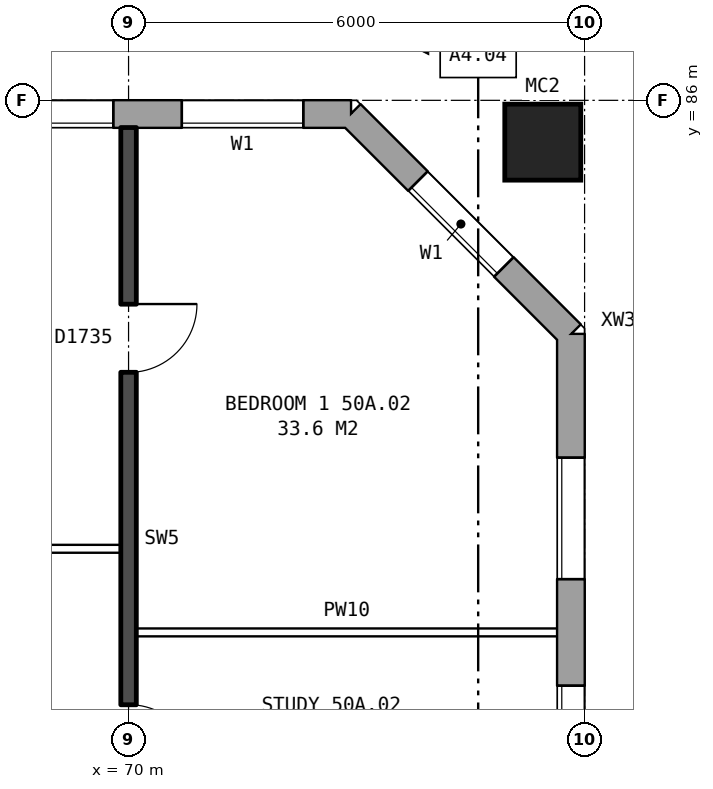
"""IFC4 building model, lengths in metres.
Left out: names, types, materials, properties, quantities, classifications, styles, units other than length and angle.
Written with IfcOpenShell. Run it as: python <this file> out.ifc"""

import sys

from ifc_helpers import new_model, si_unit, direction, frame, frame_2d, origin, origin_2d, place, context, subcontext, project, spatial, rectangle, hollow_rectangle, extrude, element, fill, save


model = new_model("IFC4")
c1 = context("Model", 3, precision=1e-05, world=origin(), true_north=direction((0.0, 1.0)))
c2 = subcontext(c1, "Body", "Model", "MODEL_VIEW")
j1 = project(units=[si_unit("LENGTHUNIT", "METRE"), si_unit("PLANEANGLEUNIT", "RADIAN")], contexts=[c1])
p1 = place(None, origin())
s1 = spatial("IfcSite", under=j1, at=p1, CompositionType="ELEMENT")
p2 = place(p1, origin())
s2 = spatial("IfcBuilding", under=s1, at=p2, CompositionType="ELEMENT")
p3 = place(p2, frame((0.0, 0.0, 178.9)))
s3 = spatial("IfcBuildingStorey", under=s2, at=p3, CompositionType="ELEMENT", Elevation=178.9)
p4 = place(p3, frame((75.45, 85.45, 0.0), z_axis=(0.0, 0.0, 1.0), x_axis=(1.0, 0.0, 0.0)))
e1 = element("IfcColumn", 1, at=p4, inside=s3, PredefinedType="COLUMN", context=c2, shape_type="SweptSolid", body=[
    extrude(hollow_rectangle(XDim=1.0, YDim=1.0, WallThickness=0.055, at=origin_2d()), origin(), (0.0, 0.0, 1.0), 3.1),
])
p5 = place(p3, frame((75.82, 57.075, 0.0), z_axis=(0.0, 0.0, 1.0), x_axis=(0.0, 1.0, 0.0)))
e2 = element("IfcWall", 2, at=p5, inside=s3, PredefinedType="STANDARD", context=c2, shape_type="SweptSolid", body=[
    extrude(rectangle(XDim=25.851, YDim=0.36, at=frame_2d((12.925, 0.0))), origin(), (0.0, 0.0, 1.0), 2.85),
])
p6 = place(p5, frame((1.625, 0.0, 0.8)))
e3 = element("IfcOpeningElement", 3, at=p6, cuts=e2, PredefinedType="OPENING", context=c2, shape_type="SweptSolid", body=[
    extrude(rectangle(XDim=1.6, YDim=1.8, at=frame_2d((0.8, 0.9))), frame((0.0, 0.19, 0.0), z_axis=(0.0, -1.0, 0.0), x_axis=(1.0, 0.0, 0.0)), (0.0, 0.0, 1.0), 0.38),
])
p7 = place(p5, frame((4.625, 0.0, 0.8)))
e4 = element("IfcOpeningElement", 4, at=p7, cuts=e2, PredefinedType="OPENING", context=c2, shape_type="SweptSolid", body=[
    extrude(rectangle(XDim=1.6, YDim=1.8, at=frame_2d((0.8, 0.9))), frame((0.0, 0.19, 0.0), z_axis=(0.0, -1.0, 0.0), x_axis=(1.0, 0.0, 0.0)), (0.0, 0.0, 1.0), 0.38),
])
p8 = place(p5, frame((19.625, 0.0, 0.8)))
e5 = element("IfcOpeningElement", 5, at=p8, cuts=e2, PredefinedType="OPENING", context=c2, shape_type="SweptSolid", body=[
    extrude(rectangle(XDim=1.6, YDim=1.8, at=frame_2d((0.8, 0.9))), frame((0.0, 0.19, 0.0), z_axis=(0.0, -1.0, 0.0), x_axis=(1.0, 0.0, 0.0)), (0.0, 0.0, 1.0), 0.38),
])
p9 = place(p5, frame((22.625, 0.0, 0.8)))
e6 = element("IfcOpeningElement", 6, at=p9, cuts=e2, PredefinedType="OPENING", context=c2, shape_type="SweptSolid", body=[
    extrude(rectangle(XDim=1.6, YDim=1.8, at=frame_2d((0.8, 0.9))), frame((0.0, 0.19, 0.0), z_axis=(0.0, -1.0, 0.0), x_axis=(1.0, 0.0, 0.0)), (0.0, 0.0, 1.0), 0.38),
])
p10 = place(p3, frame((75.82, 82.925, 0.0), z_axis=(0.0, 0.0, 1.0), x_axis=(-0.707106781187, 0.707106781187, 0.0)))
e7 = element("IfcWall", 7, at=p10, inside=s3, PredefinedType="STANDARD", context=c2, shape_type="SweptSolid", body=[
    extrude(rectangle(XDim=4.094, YDim=0.36, at=frame_2d((2.047, 0.0))), origin(), (0.0, 0.0, 1.0), 2.85),
])
p11 = place(p10, frame((1.247, 0.0, 0.8)))
e8 = element("IfcOpeningElement", 8, at=p11, cuts=e7, PredefinedType="OPENING", context=c2, shape_type="SweptSolid", body=[
    extrude(rectangle(XDim=1.6, YDim=1.8, at=frame_2d((0.8, 0.9))), frame((0.0, 0.19, 0.0), z_axis=(0.0, -1.0, 0.0), x_axis=(1.0, 0.0, 0.0)), (0.0, 0.0, 1.0), 0.38),
])
p12 = place(p3, frame((72.925, 85.82, 0.0), z_axis=(0.0, 0.0, 1.0), x_axis=(-1.0, 0.0, 0.0)))
e9 = element("IfcWall", 9, at=p12, inside=s3, PredefinedType="STANDARD", context=c2, shape_type="SweptSolid", body=[
    extrude(rectangle(XDim=39.601, YDim=0.36, at=frame_2d((19.8, 0.0))), origin(), (0.0, 0.0, 1.0), 2.85),
])
p13 = place(p12, frame((0.625, 0.0, 0.8)))
e10 = element("IfcOpeningElement", 10, at=p13, cuts=e9, PredefinedType="OPENING", context=c2, shape_type="SweptSolid", body=[
    extrude(rectangle(XDim=1.6, YDim=1.8, at=frame_2d((0.8, 0.9))), frame((0.0, 0.19, 0.0), z_axis=(0.0, -1.0, 0.0), x_axis=(1.0, 0.0, 0.0)), (0.0, 0.0, 1.0), 0.38),
])
p14 = place(p12, frame((3.125, 0.0, 0.8)))
e11 = element("IfcOpeningElement", 11, at=p14, cuts=e9, PredefinedType="OPENING", context=c2, shape_type="SweptSolid", body=[
    extrude(rectangle(XDim=1.6, YDim=1.8, at=frame_2d((0.8, 0.9))), frame((0.0, 0.19, 0.0), z_axis=(0.0, -1.0, 0.0), x_axis=(1.0, 0.0, 0.0)), (0.0, 0.0, 1.0), 0.38),
])
p15 = place(p12, frame((5.025, 0.0, 1.7)))
e12 = element("IfcOpeningElement", 12, at=p15, cuts=e9, PredefinedType="OPENING", context=c2, shape_type="SweptSolid", body=[
    extrude(rectangle(XDim=0.6, YDim=0.9, at=frame_2d((0.3, 0.45))), frame((0.0, 0.19, 0.0), z_axis=(0.0, -1.0, 0.0), x_axis=(1.0, 0.0, 0.0)), (0.0, 0.0, 1.0), 0.38),
])
p16 = place(p12, frame((9.625, 0.0, 0.8)))
e13 = element("IfcOpeningElement", 13, at=p16, cuts=e9, PredefinedType="OPENING", context=c2, shape_type="SweptSolid", body=[
    extrude(rectangle(XDim=1.6, YDim=1.8, at=frame_2d((0.8, 0.9))), frame((0.0, 0.19, 0.0), z_axis=(0.0, -1.0, 0.0), x_axis=(1.0, 0.0, 0.0)), (0.0, 0.0, 1.0), 0.38),
])
p17 = place(p12, frame((12.625, 0.0, 0.8)))
e14 = element("IfcOpeningElement", 14, at=p17, cuts=e9, PredefinedType="OPENING", context=c2, shape_type="SweptSolid", body=[
    extrude(rectangle(XDim=1.6, YDim=1.8, at=frame_2d((0.8, 0.9))), frame((0.0, 0.19, 0.0), z_axis=(0.0, -1.0, 0.0), x_axis=(1.0, 0.0, 0.0)), (0.0, 0.0, 1.0), 0.38),
])
p18 = place(p12, frame((15.625, 0.0, 0.8)))
e15 = element("IfcOpeningElement", 15, at=p18, cuts=e9, PredefinedType="OPENING", context=c2, shape_type="SweptSolid", body=[
    extrude(rectangle(XDim=1.6, YDim=1.8, at=frame_2d((0.8, 0.9))), frame((0.0, 0.19, 0.0), z_axis=(0.0, -1.0, 0.0), x_axis=(1.0, 0.0, 0.0)), (0.0, 0.0, 1.0), 0.38),
])
p19 = place(p12, frame((18.625, 0.0, 0.8)))
e16 = element("IfcOpeningElement", 16, at=p19, cuts=e9, PredefinedType="OPENING", context=c2, shape_type="SweptSolid", body=[
    extrude(rectangle(XDim=1.6, YDim=1.8, at=frame_2d((0.8, 0.9))), frame((0.0, 0.19, 0.0), z_axis=(0.0, -1.0, 0.0), x_axis=(1.0, 0.0, 0.0)), (0.0, 0.0, 1.0), 0.38),
])
p20 = place(p12, frame((21.625, 0.0, 0.8)))
e17 = element("IfcOpeningElement", 17, at=p20, cuts=e9, PredefinedType="OPENING", context=c2, shape_type="SweptSolid", body=[
    extrude(rectangle(XDim=1.6, YDim=1.8, at=frame_2d((0.8, 0.9))), frame((0.0, 0.19, 0.0), z_axis=(0.0, -1.0, 0.0), x_axis=(1.0, 0.0, 0.0)), (0.0, 0.0, 1.0), 0.38),
])
p21 = place(p12, frame((24.625, 0.0, 0.8)))
e18 = element("IfcOpeningElement", 18, at=p21, cuts=e9, PredefinedType="OPENING", context=c2, shape_type="SweptSolid", body=[
    extrude(rectangle(XDim=1.6, YDim=1.8, at=frame_2d((0.8, 0.9))), frame((0.0, 0.19, 0.0), z_axis=(0.0, -1.0, 0.0), x_axis=(1.0, 0.0, 0.0)), (0.0, 0.0, 1.0), 0.38),
])
p22 = place(p12, frame((27.625, 0.0, 0.8)))
e19 = element("IfcOpeningElement", 19, at=p22, cuts=e9, PredefinedType="OPENING", context=c2, shape_type="SweptSolid", body=[
    extrude(rectangle(XDim=1.6, YDim=1.8, at=frame_2d((0.8, 0.9))), frame((0.0, 0.19, 0.0), z_axis=(0.0, -1.0, 0.0), x_axis=(1.0, 0.0, 0.0)), (0.0, 0.0, 1.0), 0.38),
])
p23 = place(p12, frame((30.625, 0.0, 0.8)))
e20 = element("IfcOpeningElement", 20, at=p23, cuts=e9, PredefinedType="OPENING", context=c2, shape_type="SweptSolid", body=[
    extrude(rectangle(XDim=1.6, YDim=1.8, at=frame_2d((0.8, 0.9))), frame((0.0, 0.19, 0.0), z_axis=(0.0, -1.0, 0.0), x_axis=(1.0, 0.0, 0.0)), (0.0, 0.0, 1.0), 0.38),
])
p24 = place(p12, frame((33.925, 0.0, 1.7)))
e21 = element("IfcOpeningElement", 21, at=p24, cuts=e9, PredefinedType="OPENING", context=c2, shape_type="SweptSolid", body=[
    extrude(rectangle(XDim=0.6, YDim=0.9, at=frame_2d((0.3, 0.45))), frame((0.0, 0.19, 0.0), z_axis=(0.0, -1.0, 0.0), x_axis=(1.0, 0.0, 0.0)), (0.0, 0.0, 1.0), 0.38),
])
p25 = place(p12, frame((36.625, 0.0, 0.8)))
e22 = element("IfcOpeningElement", 22, at=p25, cuts=e9, PredefinedType="OPENING", context=c2, shape_type="SweptSolid", body=[
    extrude(rectangle(XDim=1.6, YDim=1.8, at=frame_2d((0.8, 0.9))), frame((0.0, 0.19, 0.0), z_axis=(0.0, -1.0, 0.0), x_axis=(1.0, 0.0, 0.0)), (0.0, 0.0, 1.0), 0.38),
])
p26 = place(p12, frame((6.825, 0.0, 0.8)))
e23 = element("IfcOpeningElement", 23, at=p26, cuts=e9, PredefinedType="OPENING", context=c2, shape_type="SweptSolid", body=[
    extrude(rectangle(XDim=0.6, YDim=0.9, at=frame_2d((0.3, 0.45))), frame((0.0, 0.19, 0.0), z_axis=(0.0, -1.0, 0.0), x_axis=(1.0, 0.0, 0.0)), (0.0, 0.0, 1.0), 0.38),
])
p27 = place(p12, frame((7.725, 0.0, 0.8)))
e24 = element("IfcOpeningElement", 24, at=p27, cuts=e9, PredefinedType="OPENING", context=c2, shape_type="SweptSolid", body=[
    extrude(rectangle(XDim=1.0, YDim=1.8, at=frame_2d((0.5, 0.9))), frame((0.0, 0.19, 0.0), z_axis=(0.0, -1.0, 0.0), x_axis=(1.0, 0.0, 0.0)), (0.0, 0.0, 1.0), 0.38),
])
p28 = place(p12, frame((34.825, 0.0, 0.8)))
e25 = element("IfcOpeningElement", 25, at=p28, cuts=e9, PredefinedType="OPENING", context=c2, shape_type="SweptSolid", body=[
    extrude(rectangle(XDim=1.4, YDim=1.8, at=frame_2d((0.7, 0.9))), frame((0.0, 0.19, 0.0), z_axis=(0.0, -1.0, 0.0), x_axis=(1.0, 0.0, 0.0)), (0.0, 0.0, 1.0), 0.38),
])
p29 = place(p3, frame((70.1, 79.0, 0.0), z_axis=(0.0, 0.0, 1.0), x_axis=(1.0, 0.0, 0.0)))
e26 = element("IfcWall", 26, at=p29, inside=s3, PredefinedType="PARTITIONING", context=c2, shape_type="SweptSolid", body=[
    extrude(rectangle(XDim=5.54, YDim=0.1, at=frame_2d((2.77, 0.0))), origin(), (0.0, 0.0, 1.0), 2.85),
])
p30 = place(p3, frame((64.1, 80.1, 0.0), z_axis=(0.0, 0.0, 1.0), x_axis=(1.0, 0.0, 0.0)))
e27 = element("IfcWall", 27, at=p30, inside=s3, PredefinedType="PARTITIONING", context=c2, shape_type="SweptSolid", body=[
    extrude(rectangle(XDim=5.8, YDim=0.1, at=frame_2d((2.9, 0.0))), origin(), (0.0, 0.0, 1.0), 2.85),
])
p31 = place(p30, frame((3.6, 0.0, 0.0)))
e28 = element("IfcOpeningElement", 28, at=p31, cuts=e27, PredefinedType="OPENING", context=c2, shape_type="SweptSolid", body=[
    extrude(rectangle(XDim=0.9, YDim=2.1, at=frame_2d((0.45, 1.05))), frame((0.0, 0.06, 0.0), z_axis=(0.0, -1.0, 0.0), x_axis=(1.0, 0.0, 0.0)), (0.0, 0.0, 1.0), 0.12),
])
p32 = place(p30, frame((0.7, 0.0, 0.0)))
e29 = element("IfcOpeningElement", 29, at=p32, cuts=e27, PredefinedType="OPENING", context=c2, shape_type="SweptSolid", body=[
    extrude(rectangle(XDim=0.9, YDim=2.1, at=frame_2d((0.45, 1.05))), frame((0.0, 0.06, 0.0), z_axis=(0.0, -1.0, 0.0), x_axis=(1.0, 0.0, 0.0)), (0.0, 0.0, 1.0), 0.12),
])
p33 = place(p3, frame((70.0, 76.2, 0.0), z_axis=(0.0, 0.0, 1.0), x_axis=(0.0, 1.0, 0.0)))
e30 = element("IfcWall", 30, at=p33, inside=s3, PredefinedType="SOLIDWALL", context=c2, shape_type="SweptSolid", body=[
    extrude(rectangle(XDim=9.44, YDim=0.2, at=frame_2d((4.72, 0.0))), origin(), (0.0, 0.0, 1.0), 2.85),
])
p34 = place(p33, frame((6.22, 0.0, 0.0)))
e31 = element("IfcOpeningElement", 31, at=p34, cuts=e30, PredefinedType="OPENING", context=c2, shape_type="SweptSolid", body=[
    extrude(rectangle(XDim=0.9, YDim=2.1, at=frame_2d((0.45, 1.05))), frame((0.0, 0.11, 0.0), z_axis=(0.0, -1.0, 0.0), x_axis=(1.0, 0.0, 0.0)), (0.0, 0.0, 1.0), 0.22),
])
p35 = place(p33, frame((0.95, 0.0, 0.0)))
e32 = element("IfcOpeningElement", 32, at=p35, cuts=e30, PredefinedType="OPENING", context=c2, shape_type="SweptSolid", body=[
    extrude(rectangle(XDim=0.9, YDim=2.1, at=frame_2d((0.45, 1.05))), frame((0.0, 0.11, 0.0), z_axis=(0.0, -1.0, 0.0), x_axis=(1.0, 0.0, 0.0)), (0.0, 0.0, 1.0), 0.22),
])
p36 = place(p8, origin())
e33 = element("IfcWindow", 33, at=p36, inside=s3, PartitioningType="SINGLE_PANEL", PredefinedType="WINDOW", context=c2, shape_type="SweptSolid", body=[
    extrude(rectangle(XDim=1.6, YDim=1.8, at=frame_2d((0.8, 0.9))), frame((0.0, 0.15, 0.0), z_axis=(0.0, -1.0, 0.0), x_axis=(1.0, 0.0, 0.0)), (0.0, 0.0, 1.0), 0.06),
])
fill(e5, e33)
p37 = place(p9, origin())
e34 = element("IfcWindow", 34, at=p37, inside=s3, PartitioningType="SINGLE_PANEL", PredefinedType="WINDOW", context=c2, shape_type="SweptSolid", body=[
    extrude(rectangle(XDim=1.6, YDim=1.8, at=frame_2d((0.8, 0.9))), frame((0.0, 0.15, 0.0), z_axis=(0.0, -1.0, 0.0), x_axis=(1.0, 0.0, 0.0)), (0.0, 0.0, 1.0), 0.06),
])
fill(e6, e34)
p38 = place(p11, origin())
e35 = element("IfcWindow", 35, at=p38, inside=s3, PartitioningType="SINGLE_PANEL", PredefinedType="WINDOW", context=c2, shape_type="SweptSolid", body=[
    extrude(rectangle(XDim=1.6, YDim=1.8, at=frame_2d((0.8, 0.9))), frame((0.0, 0.15, 0.0), z_axis=(0.0, -1.0, 0.0), x_axis=(1.0, 0.0, 0.0)), (0.0, 0.0, 1.0), 0.06),
])
fill(e8, e35)
p39 = place(p13, origin())
e36 = element("IfcWindow", 36, at=p39, inside=s3, PartitioningType="SINGLE_PANEL", PredefinedType="WINDOW", context=c2, shape_type="SweptSolid", body=[
    extrude(rectangle(XDim=1.6, YDim=1.8, at=frame_2d((0.8, 0.9))), frame((0.0, 0.15, 0.0), z_axis=(0.0, -1.0, 0.0), x_axis=(1.0, 0.0, 0.0)), (0.0, 0.0, 1.0), 0.06),
])
fill(e10, e36)
p40 = place(p14, origin())
e37 = element("IfcWindow", 37, at=p40, inside=s3, PartitioningType="SINGLE_PANEL", PredefinedType="WINDOW", context=c2, shape_type="SweptSolid", body=[
    extrude(rectangle(XDim=1.6, YDim=1.8, at=frame_2d((0.8, 0.9))), frame((0.0, 0.15, 0.0), z_axis=(0.0, -1.0, 0.0), x_axis=(1.0, 0.0, 0.0)), (0.0, 0.0, 1.0), 0.06),
])
fill(e11, e37)
p41 = place(p34, frame((0.9, 0.0, 0.0), z_axis=(0.0, 0.0, 1.0), x_axis=(-1.0, 0.0, 0.0)))
e38 = element("IfcDoor", 38, at=p41, inside=s3, OperationType="SINGLE_SWING_LEFT", PredefinedType="DOOR", context=c2, shape_type="SweptSolid", body=[
    extrude(rectangle(XDim=0.9, YDim=2.1, at=frame_2d((0.45, 1.05))), frame((0.0, 0.025, 0.0), z_axis=(0.0, -1.0, 0.0), x_axis=(1.0, 0.0, 0.0)), (0.0, 0.0, 1.0), 0.05),
])
fill(e31, e38)
p42 = place(p35, frame((0.9, 0.0, 0.0), z_axis=(0.0, 0.0, 1.0), x_axis=(-1.0, 0.0, 0.0)))
e39 = element("IfcDoor", 39, at=p42, inside=s3, OperationType="SINGLE_SWING_RIGHT", PredefinedType="DOOR", context=c2, shape_type="SweptSolid", body=[
    extrude(rectangle(XDim=0.9, YDim=2.1, at=frame_2d((0.45, 1.05))), frame((0.0, 0.025, 0.0), z_axis=(0.0, -1.0, 0.0), x_axis=(1.0, 0.0, 0.0)), (0.0, 0.0, 1.0), 0.05),
])
fill(e32, e39)
save(model, sys.argv[1])
